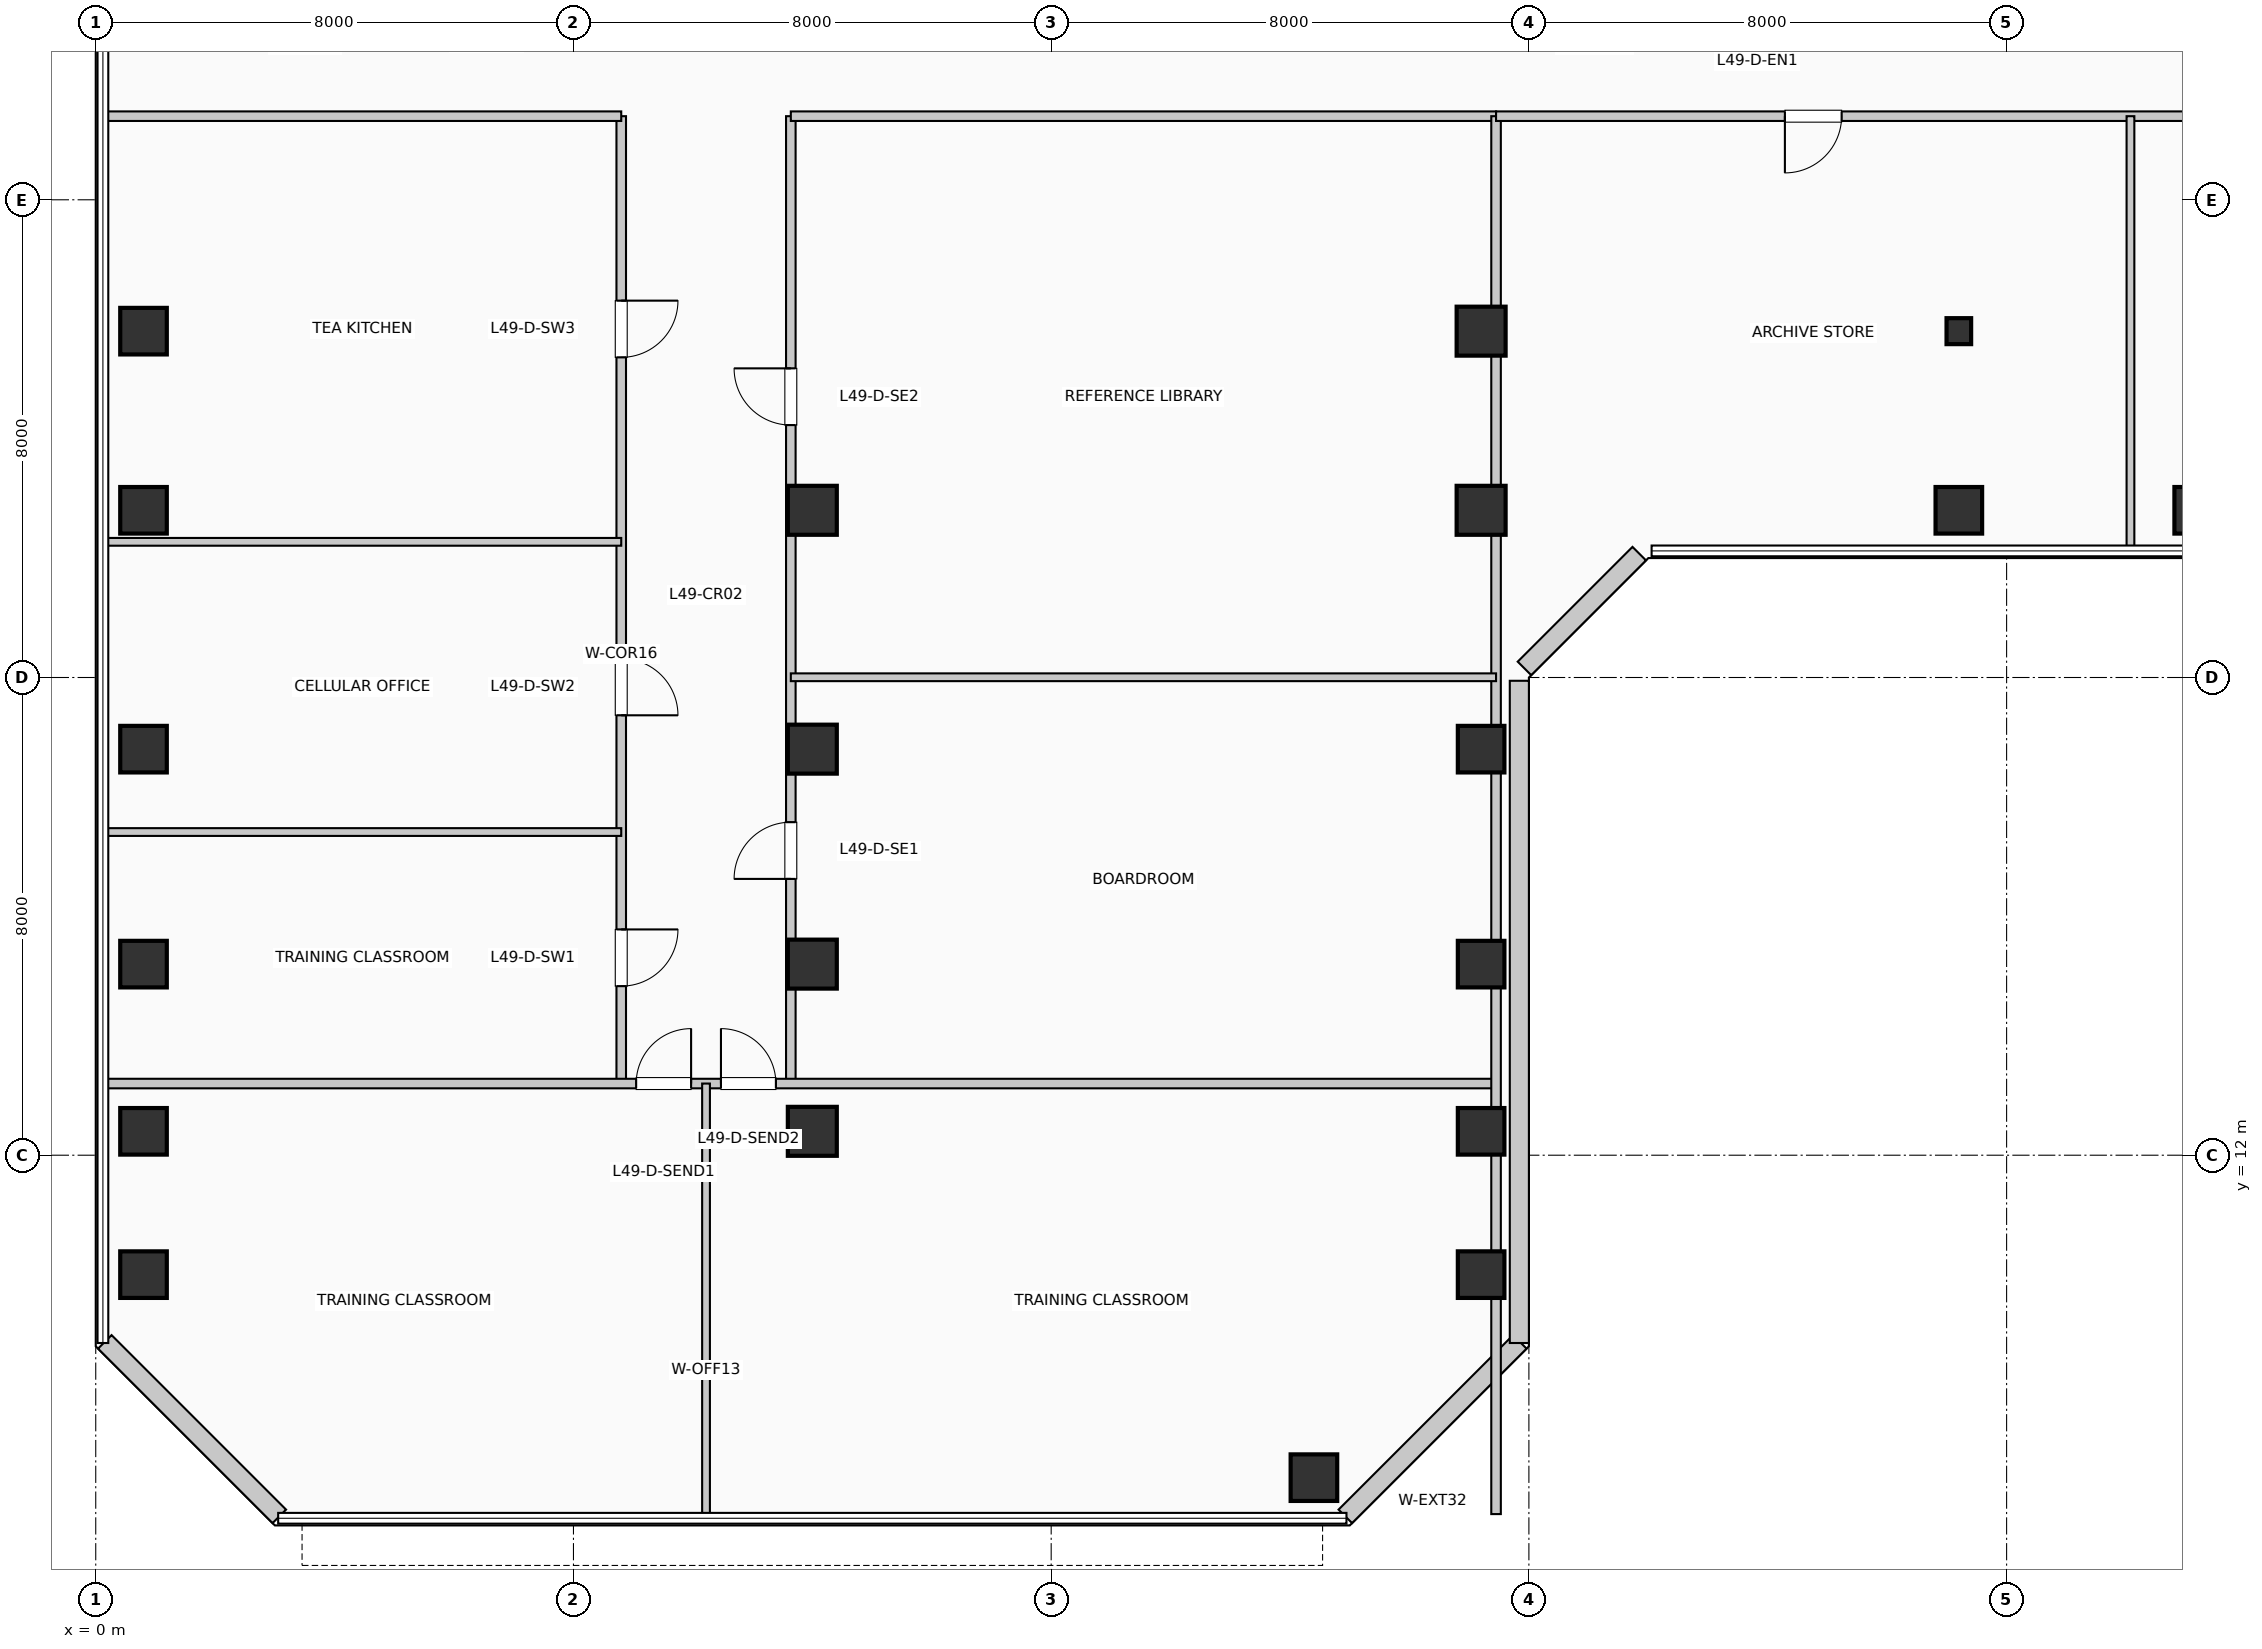
"""IFC4 building model, lengths in metres.
Left out: names, types, materials, properties, quantities, classifications, styles, units other than length and angle.
Written with IfcOpenShell. Run it as: python <this file> out.ifc"""

import sys

from ifc_helpers import new_model, si_unit, direction, frame, frame_2d, origin, origin_2d, place, context, subcontext, project, spatial, rectangle, i_section, extrude, element, fill, save


model = new_model("IFC4")
c1 = context("Model", 3, precision=1e-05, world=origin(), true_north=direction((0.0, 1.0)))
c2 = subcontext(c1, "Body", "Model", "MODEL_VIEW")
j1 = project(units=[si_unit("LENGTHUNIT", "METRE"), si_unit("PLANEANGLEUNIT", "RADIAN")], contexts=[c1])
p1 = place(None, origin())
s1 = spatial("IfcSite", under=j1, at=p1, CompositionType="ELEMENT")
p2 = place(p1, origin())
s2 = spatial("IfcBuilding", under=s1, at=p2, CompositionType="ELEMENT")
p3 = place(p2, frame((0.0, 0.0, 203.28)))
s3 = spatial("IfcBuildingStorey", under=s2, at=p3, CompositionType="ELEMENT", Elevation=203.28)
for number, where, z_axis, x_axis in (
    (1, (0.8, 10.0, 0.0), (0.0, 0.0, 1.0), (1.0, 0.0, 0.0)),
    (2, (0.8, 12.4, 0.0), (0.0, 0.0, 1.0), (1.0, 0.0, 0.0)),
    (3, (0.8, 15.2, 0.0), (0.0, 0.0, 1.0), (1.0, 0.0, 0.0)),
    (4, (0.8, 18.8, 0.0), (0.0, 0.0, 1.0), (1.0, 0.0, 0.0)),
    (5, (0.8, 22.8, 0.0), (0.0, 0.0, 1.0), (1.0, 0.0, 0.0)),
    (6, (0.8, 25.8, 0.0), (0.0, 0.0, 1.0), (1.0, 0.0, 0.0)),
):
    element("IfcColumn", number, at=place(p3, frame(where, z_axis=z_axis, x_axis=x_axis)), inside=s3, PredefinedType="COLUMN", context=c2, shape_type="SweptSolid", body=[
        extrude(rectangle(XDim=0.78, YDim=0.78, at=origin_2d()), origin(), (0.0, 0.0, 1.0), 3.96),
    ])
for number, where, z_axis, x_axis in (
    (7, (12.0, 12.4, 0.0), (0.0, 0.0, 1.0), (1.0, 0.0, 0.0)),
    (8, (12.0, 15.2, 0.0), (0.0, 0.0, 1.0), (1.0, 0.0, 0.0)),
    (9, (12.0, 18.8, 0.0), (0.0, 0.0, 1.0), (1.0, 0.0, 0.0)),
    (10, (12.0, 22.8, 0.0), (0.0, 0.0, 1.0), (1.0, 0.0, 0.0)),
):
    element("IfcColumn", number, at=place(p3, frame(where, z_axis=z_axis, x_axis=x_axis)), inside=s3, PredefinedType="COLUMN", context=c2, shape_type="SweptSolid", body=[
        extrude(rectangle(XDim=0.82, YDim=0.82, at=origin_2d()), origin(), (0.0, 0.0, 1.0), 3.96),
    ])
for number, where, z_axis, x_axis in (
    (11, (20.4, 6.6, 0.0), (0.0, 0.0, 1.0), (1.0, 0.0, 0.0)),
    (12, (23.2, 10.0, 0.0), (0.0, 0.0, 1.0), (1.0, 0.0, 0.0)),
    (13, (23.2, 12.4, 0.0), (0.0, 0.0, 1.0), (1.0, 0.0, 0.0)),
    (14, (23.2, 15.2, 0.0), (0.0, 0.0, 1.0), (1.0, 0.0, 0.0)),
    (15, (23.2, 18.8, 0.0), (0.0, 0.0, 1.0), (1.0, 0.0, 0.0)),
):
    element("IfcColumn", number, at=place(p3, frame(where, z_axis=z_axis, x_axis=x_axis)), inside=s3, PredefinedType="COLUMN", context=c2, shape_type="SweptSolid", body=[
        extrude(rectangle(XDim=0.78, YDim=0.78, at=origin_2d()), origin(), (0.0, 0.0, 1.0), 3.96),
    ])
for number, where, z_axis, x_axis in (
    (16, (23.2, 22.8, 0.0), (0.0, 0.0, 1.0), (1.0, 0.0, 0.0)),
    (17, (23.2, 25.8, 0.0), (0.0, 0.0, 1.0), (1.0, 0.0, 0.0)),
):
    element("IfcColumn", number, at=place(p3, frame(where, z_axis=z_axis, x_axis=x_axis)), inside=s3, PredefinedType="COLUMN", context=c2, shape_type="SweptSolid", body=[
        extrude(rectangle(XDim=0.82, YDim=0.82, at=origin_2d()), origin(), (0.0, 0.0, 1.0), 3.96),
    ])
p4 = place(p3, frame((31.2, 22.8, 0.0), z_axis=(0.0, 0.0, 1.0), x_axis=(1.0, 0.0, 0.0)))
e18 = element("IfcColumn", 18, at=p4, inside=s3, PredefinedType="COLUMN", context=c2, shape_type="SweptSolid", body=[
    extrude(rectangle(XDim=0.78, YDim=0.78, at=origin_2d()), origin(), (0.0, 0.0, 1.0), 3.96),
])
p5 = place(p3, frame((31.2, 25.8, 0.0), z_axis=(0.0, 0.0, 1.0), x_axis=(1.0, 0.0, 0.0)))
e19 = element("IfcColumn", 19, at=p5, inside=s3, PredefinedType="COLUMN", context=c2, shape_type="SweptSolid", body=[
    extrude(i_section(OverallWidth=0.412, OverallDepth=0.435, WebThickness=0.027, FlangeThickness=0.043, at=origin_2d()), origin(), (0.0, 0.0, 1.0), 3.96),
])
p6 = place(p3, frame((35.2, 22.8, 0.0), z_axis=(0.0, 0.0, 1.0), x_axis=(1.0, 0.0, 0.0)))
e20 = element("IfcColumn", 20, at=p6, inside=s3, PredefinedType="COLUMN", context=c2, shape_type="SweptSolid", body=[
    extrude(rectangle(XDim=0.78, YDim=0.78, at=origin_2d()), origin(), (0.0, 0.0, 1.0), 3.96),
])
p7 = place(p3, frame((20.926, 5.952, 0.0), z_axis=(0.0, 0.0, 1.0), x_axis=(0.707077242712, 0.707136318428, 0.0)))
e21 = element("IfcWall", 21, at=p7, inside=s3, PredefinedType="SOLIDWALL", context=c2, shape_type="SweptSolid", body=[
    extrude(rectangle(XDim=4.133, YDim=0.32, at=frame_2d((2.066, 0.0))), origin(), (0.0, 0.0, 1.0), 3.71),
])
p8 = place(p3, frame((23.84, 8.855, 0.0), z_axis=(0.0, 0.0, 1.0), x_axis=(0.0, 1.0, 0.0)))
e22 = element("IfcWall", 22, at=p8, inside=s3, PredefinedType="SOLIDWALL", context=c2, shape_type="SweptSolid", body=[
    extrude(rectangle(XDim=11.09, YDim=0.32, at=frame_2d((5.545, 0.0))), origin(), (0.0, 0.0, 1.0), 3.71),
])
p9 = place(p3, frame((23.926, 20.152, 0.0), z_axis=(0.0, 0.0, 1.0), x_axis=(0.707106781187, 0.707106781187, 0.0)))
e23 = element("IfcWall", 23, at=p9, inside=s3, PredefinedType="SOLIDWALL", context=c2, shape_type="SweptSolid", body=[
    extrude(rectangle(XDim=2.718, YDim=0.32, at=frame_2d((1.359, 0.0))), origin(), (0.0, 0.0, 1.0), 3.71),
])
p10 = place(p3, frame((0.152, 8.874, 0.0), z_axis=(0.0, 0.0, 1.0), x_axis=(0.707077242712, -0.707136318428, 0.0)))
e24 = element("IfcWall", 24, at=p10, inside=s3, PredefinedType="SOLIDWALL", context=c2, shape_type="SweptSolid", body=[
    extrude(rectangle(XDim=4.133, YDim=0.32, at=frame_2d((2.066, 0.0))), origin(), (0.0, 0.0, 1.0), 3.71),
])
p11 = place(p3, frame((8.8, 13.2, 0.0), z_axis=(0.0, 0.0, 1.0), x_axis=(0.0, 1.0, 0.0)))
e25 = element("IfcWall", 25, at=p11, inside=s3, PredefinedType="PARTITIONING", context=c2, shape_type="SweptSolid", body=[
    extrude(rectangle(XDim=16.2, YDim=0.16, at=frame_2d((8.1, 0.0))), origin(), (0.0, 0.0, 1.0), 3.71),
])
p12 = place(p11, frame((2.581, 0.0, 0.0), z_axis=(0.0, 0.0, 1.0), x_axis=(-1.0, 0.0, 0.0)))
e26 = element("IfcOpeningElement", 26, at=p12, cuts=e25, PredefinedType="OPENING", context=c2, shape_type="SweptSolid", body=[
    extrude(rectangle(XDim=0.95, YDim=2.15, at=frame_2d((0.475, 1.075))), frame((0.0, 0.09, 0.0), z_axis=(0.0, -1.0, 0.0), x_axis=(1.0, 0.0, 0.0)), (0.0, 0.0, 1.0), 0.18),
])
p13 = place(p11, frame((7.117, 0.0, 0.0), z_axis=(0.0, 0.0, 1.0), x_axis=(-1.0, 0.0, 0.0)))
e27 = element("IfcOpeningElement", 27, at=p13, cuts=e25, PredefinedType="OPENING", context=c2, shape_type="SweptSolid", body=[
    extrude(rectangle(XDim=0.95, YDim=2.15, at=frame_2d((0.475, 1.075))), frame((0.0, 0.09, 0.0), z_axis=(0.0, -1.0, 0.0), x_axis=(1.0, 0.0, 0.0)), (0.0, 0.0, 1.0), 0.18),
])
p14 = place(p11, frame((13.111, 0.0, 0.0), z_axis=(0.0, 0.0, 1.0), x_axis=(-1.0, 0.0, 0.0)))
e28 = element("IfcOpeningElement", 28, at=p14, cuts=e25, PredefinedType="OPENING", context=c2, shape_type="SweptSolid", body=[
    extrude(rectangle(XDim=0.95, YDim=2.15, at=frame_2d((0.475, 1.075))), frame((0.0, 0.09, 0.0), z_axis=(0.0, -1.0, 0.0), x_axis=(1.0, 0.0, 0.0)), (0.0, 0.0, 1.0), 0.18),
])
p15 = place(p3, frame((11.64, 13.2, 0.0), z_axis=(0.0, 0.0, 1.0), x_axis=(0.0, 1.0, 0.0)))
e29 = element("IfcWall", 29, at=p15, inside=s3, PredefinedType="PARTITIONING", context=c2, shape_type="SweptSolid", body=[
    extrude(rectangle(XDim=16.2, YDim=0.16, at=frame_2d((8.1, 0.0))), origin(), (0.0, 0.0, 1.0), 3.095),
])
p16 = place(p15, frame((3.427, 0.0, 0.0)))
e30 = element("IfcOpeningElement", 30, at=p16, cuts=e29, PredefinedType="OPENING", context=c2, shape_type="SweptSolid", body=[
    extrude(rectangle(XDim=0.95, YDim=2.15, at=frame_2d((0.475, 1.075))), frame((0.0, 0.09, 0.0), z_axis=(0.0, -1.0, 0.0), x_axis=(1.0, 0.0, 0.0)), (0.0, 0.0, 1.0), 0.18),
])
p17 = place(p15, frame((11.027, 0.0, 0.0)))
e31 = element("IfcOpeningElement", 31, at=p17, cuts=e29, PredefinedType="OPENING", context=c2, shape_type="SweptSolid", body=[
    extrude(rectangle(XDim=0.95, YDim=2.15, at=frame_2d((0.475, 1.075))), frame((0.0, 0.09, 0.0), z_axis=(0.0, -1.0, 0.0), x_axis=(1.0, 0.0, 0.0)), (0.0, 0.0, 1.0), 0.18),
])
p18 = place(p3, frame((0.19, 13.2, 0.0), z_axis=(0.0, 0.0, 1.0), x_axis=(1.0, 0.0, 0.0)))
e32 = element("IfcWall", 32, at=p18, inside=s3, PredefinedType="PARTITIONING", context=c2, shape_type="SweptSolid", body=[
    extrude(rectangle(XDim=23.26, YDim=0.16, at=frame_2d((11.63, 0.0))), origin(), (0.0, 0.0, 1.0), 3.71),
])
p19 = place(p18, frame((8.86, 0.0, 0.0)))
e33 = element("IfcOpeningElement", 33, at=p19, cuts=e32, PredefinedType="OPENING", context=c2, shape_type="SweptSolid", body=[
    extrude(rectangle(XDim=0.92, YDim=2.1, at=frame_2d((0.46, 1.05))), frame((0.0, 0.09, 0.0), z_axis=(0.0, -1.0, 0.0), x_axis=(1.0, 0.0, 0.0)), (0.0, 0.0, 1.0), 0.18),
])
p20 = place(p18, frame((10.28, 0.0, 0.0)))
e34 = element("IfcOpeningElement", 34, at=p20, cuts=e32, PredefinedType="OPENING", context=c2, shape_type="SweptSolid", body=[
    extrude(rectangle(XDim=0.92, YDim=2.1, at=frame_2d((0.46, 1.05))), frame((0.0, 0.09, 0.0), z_axis=(0.0, -1.0, 0.0), x_axis=(1.0, 0.0, 0.0)), (0.0, 0.0, 1.0), 0.18),
])
p21 = place(p3, frame((0.19, 29.4, 0.0), z_axis=(0.0, 0.0, 1.0), x_axis=(1.0, 0.0, 0.0)))
e35 = element("IfcWall", 35, at=p21, inside=s3, PredefinedType="PARTITIONING", context=c2, shape_type="SweptSolid", body=[
    extrude(rectangle(XDim=8.61, YDim=0.16, at=frame_2d((4.305, 0.0))), origin(), (0.0, 0.0, 1.0), 3.365),
])
p22 = place(p3, frame((11.64, 29.4, 0.0), z_axis=(0.0, 0.0, 1.0), x_axis=(1.0, 0.0, 0.0)))
e36 = element("IfcWall", 36, at=p22, inside=s3, PredefinedType="PARTITIONING", context=c2, shape_type="SweptSolid", body=[
    extrude(rectangle(XDim=11.81, YDim=0.16, at=frame_2d((5.905, 0.0))), origin(), (0.0, 0.0, 1.0), 3.365),
])
p23 = place(p3, frame((23.45, 5.99, 0.0), z_axis=(0.0, 0.0, 1.0), x_axis=(0.0, 1.0, 0.0)))
e37 = element("IfcWall", 37, at=p23, inside=s3, PredefinedType="PARTITIONING", context=c2, shape_type="SweptSolid", body=[
    extrude(rectangle(XDim=23.41, YDim=0.16, at=frame_2d((11.705, 0.0))), origin(), (0.0, 0.0, 1.0), 3.095),
])
p24 = place(p3, frame((10.22, 5.99, 0.0), z_axis=(0.0, 0.0, 1.0), x_axis=(0.0, 1.0, 0.0)))
e38 = element("IfcWall", 38, at=p24, inside=s3, PredefinedType="PARTITIONING", context=c2, shape_type="SweptSolid", body=[
    extrude(rectangle(XDim=7.21, YDim=0.13, at=frame_2d((3.605, 0.0))), origin(), (0.0, 0.0, 1.0), 3.71),
])
for number, where, z_axis, x_axis in (
    (39, (0.19, 17.412, 0.0), (0.0, 0.0, 1.0), (1.0, 0.0, 0.0)),
    (40, (0.19, 22.272, 0.0), (0.0, 0.0, 1.0), (1.0, 0.0, 0.0)),
):
    element("IfcWall", number, at=place(p3, frame(where, z_axis=z_axis, x_axis=x_axis)), inside=s3, PredefinedType="PARTITIONING", context=c2, shape_type="SweptSolid", body=[
        extrude(rectangle(XDim=8.61, YDim=0.13, at=frame_2d((4.305, 0.0))), origin(), (0.0, 0.0, 1.0), 3.71),
    ])
p25 = place(p3, frame((11.64, 20.004, 0.0), z_axis=(0.0, 0.0, 1.0), x_axis=(1.0, 0.0, 0.0)))
e41 = element("IfcWall", 41, at=p25, inside=s3, PredefinedType="PARTITIONING", context=c2, shape_type="SweptSolid", body=[
    extrude(rectangle(XDim=11.81, YDim=0.13, at=frame_2d((5.905, 0.0))), origin(), (0.0, 0.0, 1.0), 3.71),
])
p26 = place(p3, frame((23.45, 29.4, 0.0), z_axis=(0.0, 0.0, 1.0), x_axis=(1.0, 0.0, 0.0)))
e42 = element("IfcWall", 42, at=p26, inside=s3, PredefinedType="PARTITIONING", context=c2, shape_type="SweptSolid", body=[
    extrude(rectangle(XDim=26.56, YDim=0.16, at=frame_2d((13.28, 0.0))), origin(), (0.0, 0.0, 1.0), 3.365),
])
p27 = place(p26, frame((5.787, 0.0, 0.0), z_axis=(0.0, 0.0, 1.0), x_axis=(-1.0, 0.0, 0.0)))
e43 = element("IfcOpeningElement", 43, at=p27, cuts=e42, PredefinedType="OPENING", context=c2, shape_type="SweptSolid", body=[
    extrude(rectangle(XDim=0.95, YDim=2.15, at=frame_2d((0.475, 1.075))), frame((0.0, 0.09, 0.0), z_axis=(0.0, -1.0, 0.0), x_axis=(1.0, 0.0, 0.0)), (0.0, 0.0, 1.0), 0.18),
])
p28 = place(p26, frame((19.067, 0.0, 0.0), z_axis=(0.0, 0.0, 1.0), x_axis=(-1.0, 0.0, 0.0)))
e44 = element("IfcOpeningElement", 44, at=p28, cuts=e42, PredefinedType="OPENING", context=c2, shape_type="SweptSolid", body=[
    extrude(rectangle(XDim=0.95, YDim=2.15, at=frame_2d((0.475, 1.075))), frame((0.0, 0.09, 0.0), z_axis=(0.0, -1.0, 0.0), x_axis=(1.0, 0.0, 0.0)), (0.0, 0.0, 1.0), 0.18),
])
p29 = place(p3, frame((34.074, 22.19, 0.0), z_axis=(0.0, 0.0, 1.0), x_axis=(0.0, 1.0, 0.0)))
e45 = element("IfcWall", 45, at=p29, inside=s3, PredefinedType="PARTITIONING", context=c2, shape_type="SweptSolid", body=[
    extrude(rectangle(XDim=7.21, YDim=0.13, at=frame_2d((3.605, 0.0))), origin(), (0.0, 0.0, 1.0), 3.71),
])
p30 = place(p19, origin())
e46 = element("IfcDoor", 46, at=p30, inside=s3, OperationType="SINGLE_SWING_RIGHT", PredefinedType="DOOR", context=c2, shape_type="SweptSolid", body=[
    extrude(rectangle(XDim=0.92, YDim=2.1, at=frame_2d((0.46, 1.05))), frame((0.0, 0.025, 0.0), z_axis=(0.0, -1.0, 0.0), x_axis=(1.0, 0.0, 0.0)), (0.0, 0.0, 1.0), 0.05),
])
fill(e33, e46)
p31 = place(p20, origin())
e47 = element("IfcDoor", 47, at=p31, inside=s3, OperationType="SINGLE_SWING_LEFT", PredefinedType="DOOR", context=c2, shape_type="SweptSolid", body=[
    extrude(rectangle(XDim=0.92, YDim=2.1, at=frame_2d((0.46, 1.05))), frame((0.0, 0.025, 0.0), z_axis=(0.0, -1.0, 0.0), x_axis=(1.0, 0.0, 0.0)), (0.0, 0.0, 1.0), 0.05),
])
fill(e34, e47)
p32 = place(p12, origin())
e48 = element("IfcDoor", 48, at=p32, inside=s3, OperationType="SINGLE_SWING_RIGHT", PredefinedType="DOOR", context=c2, shape_type="SweptSolid", body=[
    extrude(rectangle(XDim=0.95, YDim=2.15, at=frame_2d((0.475, 1.075))), frame((0.0, 0.025, 0.0), z_axis=(0.0, -1.0, 0.0), x_axis=(1.0, 0.0, 0.0)), (0.0, 0.0, 1.0), 0.05),
])
fill(e26, e48)
p33 = place(p13, origin())
e49 = element("IfcDoor", 49, at=p33, inside=s3, OperationType="SINGLE_SWING_LEFT", PredefinedType="DOOR", context=c2, shape_type="SweptSolid", body=[
    extrude(rectangle(XDim=0.95, YDim=2.15, at=frame_2d((0.475, 1.075))), frame((0.0, 0.025, 0.0), z_axis=(0.0, -1.0, 0.0), x_axis=(1.0, 0.0, 0.0)), (0.0, 0.0, 1.0), 0.05),
])
fill(e27, e49)
p34 = place(p14, origin())
e50 = element("IfcDoor", 50, at=p34, inside=s3, OperationType="SINGLE_SWING_RIGHT", PredefinedType="DOOR", context=c2, shape_type="SweptSolid", body=[
    extrude(rectangle(XDim=0.95, YDim=2.15, at=frame_2d((0.475, 1.075))), frame((0.0, 0.025, 0.0), z_axis=(0.0, -1.0, 0.0), x_axis=(1.0, 0.0, 0.0)), (0.0, 0.0, 1.0), 0.05),
])
fill(e28, e50)
p35 = place(p16, origin())
e51 = element("IfcDoor", 51, at=p35, inside=s3, OperationType="SINGLE_SWING_LEFT", PredefinedType="DOOR", context=c2, shape_type="SweptSolid", body=[
    extrude(rectangle(XDim=0.95, YDim=2.15, at=frame_2d((0.475, 1.075))), frame((0.0, 0.025, 0.0), z_axis=(0.0, -1.0, 0.0), x_axis=(1.0, 0.0, 0.0)), (0.0, 0.0, 1.0), 0.05),
])
fill(e30, e51)
p36 = place(p17, origin())
e52 = element("IfcDoor", 52, at=p36, inside=s3, OperationType="SINGLE_SWING_RIGHT", PredefinedType="DOOR", context=c2, shape_type="SweptSolid", body=[
    extrude(rectangle(XDim=0.95, YDim=2.15, at=frame_2d((0.475, 1.075))), frame((0.0, 0.025, 0.0), z_axis=(0.0, -1.0, 0.0), x_axis=(1.0, 0.0, 0.0)), (0.0, 0.0, 1.0), 0.05),
])
fill(e31, e52)
p37 = place(p27, origin())
e53 = element("IfcDoor", 53, at=p37, inside=s3, OperationType="SINGLE_SWING_LEFT", PredefinedType="DOOR", context=c2, shape_type="SweptSolid", body=[
    extrude(rectangle(XDim=0.95, YDim=2.15, at=frame_2d((0.475, 1.075))), frame((0.0, 0.025, 0.0), z_axis=(0.0, -1.0, 0.0), x_axis=(1.0, 0.0, 0.0)), (0.0, 0.0, 1.0), 0.05),
])
fill(e43, e53)
save(model, sys.argv[1])
